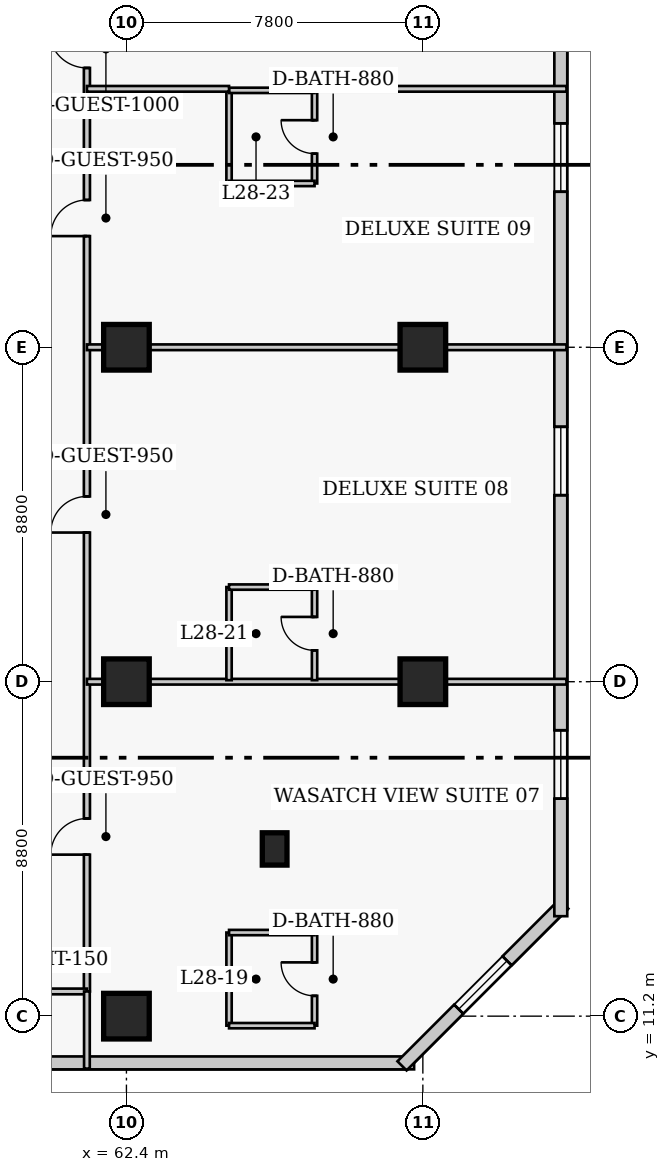
"""IFC4 building model, lengths in metres.
Left out: names, types, materials, properties, quantities, classifications, styles, units other than length and angle.
Written with IfcOpenShell. Run it as: python <this file> out.ifc"""

import sys

from ifc_helpers import new_model, si_unit, direction, frame, frame_2d, origin, origin_2d, place, context, subcontext, project, spatial, rectangle, extrude, element, fill, save


model = new_model("IFC4")
c1 = context("Model", 3, precision=1e-05, world=origin(), true_north=direction((0.0, 1.0)))
c2 = subcontext(c1, "Body", "Model", "MODEL_VIEW")
j1 = project(units=[si_unit("LENGTHUNIT", "METRE"), si_unit("PLANEANGLEUNIT", "RADIAN")], contexts=[c1])
p1 = place(None, origin())
s1 = spatial("IfcSite", under=j1, at=p1, CompositionType="ELEMENT")
p2 = place(p1, origin())
s2 = spatial("IfcBuilding", under=s1, at=p2, CompositionType="ELEMENT")
p3 = place(p2, frame((0.0, 0.0, 114.6)))
s3 = spatial("IfcBuildingStorey", under=s2, at=p3, CompositionType="ELEMENT", Elevation=114.6)
for number, where, z_axis, x_axis in (
    (1, (62.4, 11.2, 0.0), (0.0, 0.0, 1.0), (1.0, 0.0, 0.0)),
    (2, (62.4, 20.0, 0.0), (0.0, 0.0, 1.0), (1.0, 0.0, 0.0)),
    (3, (62.4, 28.8, 0.0), (0.0, 0.0, 1.0), (1.0, 0.0, 0.0)),
    (4, (70.2, 20.0, 0.0), (0.0, 0.0, 1.0), (1.0, 0.0, 0.0)),
    (5, (70.2, 28.8, 0.0), (0.0, 0.0, 1.0), (1.0, 0.0, 0.0)),
):
    element("IfcColumn", number, at=place(p3, frame(where, z_axis=z_axis, x_axis=x_axis)), inside=s3, PredefinedType="COLUMN", context=c2, shape_type="SweptSolid", body=[
        extrude(rectangle(XDim=1.2, YDim=1.2, at=origin_2d()), origin(), (0.0, 0.0, 1.0), 3.8),
    ])
p4 = place(p3, frame((66.3, 15.6, 0.0), z_axis=(0.0, 0.0, 1.0), x_axis=(1.0, 0.0, 0.0)))
e6 = element("IfcColumn", 6, at=p4, inside=s3, PredefinedType="PILASTER", context=c2, shape_type="SweptSolid", body=[
    extrude(rectangle(XDim=0.65, YDim=0.85, at=origin_2d()), origin(), (0.0, 0.0, 1.0), 3.8),
])
p5 = place(p3, frame((41.68, 9.97, 0.0), z_axis=(0.0, 0.0, 1.0), x_axis=(1.0, 0.0, 0.0)))
e7 = element("IfcWall", 7, at=p5, inside=s3, PredefinedType="SOLIDWALL", context=c2, shape_type="SweptSolid", body=[
    extrude(rectangle(XDim=28.29, YDim=0.34, at=frame_2d((14.145, 0.0))), origin(), (0.0, 0.0, 1.0), 3.54),
])
p6 = place(p5, frame((8.32, 0.0, 0.0)))
e8 = element("IfcOpeningElement", 8, at=p6, cuts=e7, PredefinedType="OPENING", context=c2, shape_type="SweptSolid", body=[
    extrude(rectangle(XDim=1.4, YDim=2.15, at=frame_2d((0.7, 1.075))), frame((0.0, 0.18, 0.0), z_axis=(0.0, -1.0, 0.0), x_axis=(1.0, 0.0, 0.0)), (0.0, 0.0, 1.0), 0.36),
])
p7 = place(p5, frame((2.665, 0.0, 0.85)))
e9 = element("IfcOpeningElement", 9, at=p7, cuts=e7, PredefinedType="OPENING", context=c2, shape_type="SweptSolid", body=[
    extrude(rectangle(XDim=1.8, YDim=1.8, at=frame_2d((0.9, 0.9))), frame((0.0, 0.18, 0.0), z_axis=(0.0, -1.0, 0.0), x_axis=(1.0, 0.0, 0.0)), (0.0, 0.0, 1.0), 0.36),
])
p8 = place(p5, frame((13.895, 0.0, 0.85)))
e10 = element("IfcOpeningElement", 10, at=p8, cuts=e7, PredefinedType="OPENING", context=c2, shape_type="SweptSolid", body=[
    extrude(rectangle(XDim=1.8, YDim=1.8, at=frame_2d((0.9, 0.9))), frame((0.0, 0.18, 0.0), z_axis=(0.0, -1.0, 0.0), x_axis=(1.0, 0.0, 0.0)), (0.0, 0.0, 1.0), 0.36),
])
p9 = place(p3, frame((69.652, 9.892, 0.0), z_axis=(0.0, 0.0, 1.0), x_axis=(0.707106781187, 0.707106781187, 0.0)))
e11 = element("IfcWall", 11, at=p9, inside=s3, PredefinedType="SOLIDWALL", context=c2, shape_type="SweptSolid", body=[
    extrude(rectangle(XDim=6.02, YDim=0.34, at=frame_2d((3.01, 0.0))), origin(), (0.0, 0.0, 1.0), 3.54),
])
p10 = place(p9, frame((2.11, 0.0, 0.85)))
e12 = element("IfcOpeningElement", 12, at=p10, cuts=e11, PredefinedType="OPENING", context=c2, shape_type="SweptSolid", body=[
    extrude(rectangle(XDim=1.8, YDim=1.8, at=frame_2d((0.9, 0.9))), frame((0.0, 0.18, 0.0), z_axis=(0.0, -1.0, 0.0), x_axis=(1.0, 0.0, 0.0)), (0.0, 0.0, 1.0), 0.36),
])
p11 = place(p3, frame((73.83, 13.83, 0.0), z_axis=(0.0, 0.0, 1.0), x_axis=(0.0, 1.0, 0.0)))
e13 = element("IfcWall", 13, at=p11, inside=s3, PredefinedType="SOLIDWALL", context=c2, shape_type="SweptSolid", body=[
    extrude(rectangle(XDim=31.94, YDim=0.34, at=frame_2d((15.97, 0.0))), origin(), (0.0, 0.0, 1.0), 3.54),
])
p12 = place(p11, frame((3.093, 0.0, 0.85)))
e14 = element("IfcOpeningElement", 14, at=p12, cuts=e13, PredefinedType="OPENING", context=c2, shape_type="SweptSolid", body=[
    extrude(rectangle(XDim=1.8, YDim=1.8, at=frame_2d((0.9, 0.9))), frame((0.0, 0.18, 0.0), z_axis=(0.0, -1.0, 0.0), x_axis=(1.0, 0.0, 0.0)), (0.0, 0.0, 1.0), 0.36),
])
p13 = place(p11, frame((11.077, 0.0, 0.85)))
e15 = element("IfcOpeningElement", 15, at=p13, cuts=e13, PredefinedType="OPENING", context=c2, shape_type="SweptSolid", body=[
    extrude(rectangle(XDim=1.8, YDim=1.8, at=frame_2d((0.9, 0.9))), frame((0.0, 0.18, 0.0), z_axis=(0.0, -1.0, 0.0), x_axis=(1.0, 0.0, 0.0)), (0.0, 0.0, 1.0), 0.36),
])
p14 = place(p11, frame((19.062, 0.0, 0.85)))
e16 = element("IfcOpeningElement", 16, at=p14, cuts=e13, PredefinedType="OPENING", context=c2, shape_type="SweptSolid", body=[
    extrude(rectangle(XDim=1.8, YDim=1.8, at=frame_2d((0.9, 0.9))), frame((0.0, 0.18, 0.0), z_axis=(0.0, -1.0, 0.0), x_axis=(1.0, 0.0, 0.0)), (0.0, 0.0, 1.0), 0.36),
])
p15 = place(p11, frame((27.048, 0.0, 0.85)))
e17 = element("IfcOpeningElement", 17, at=p15, cuts=e13, PredefinedType="OPENING", context=c2, shape_type="SweptSolid", body=[
    extrude(rectangle(XDim=1.8, YDim=1.8, at=frame_2d((0.9, 0.9))), frame((0.0, 0.18, 0.0), z_axis=(0.0, -1.0, 0.0), x_axis=(1.0, 0.0, 0.0)), (0.0, 0.0, 1.0), 0.36),
])
p16 = place(p3, frame((61.36, 11.85, 0.0), z_axis=(0.0, 0.0, 1.0), x_axis=(0.0, 1.0, 0.0)))
e18 = element("IfcWall", 18, at=p16, inside=s3, PredefinedType="PARTITIONING", context=c2, shape_type="SweptSolid", body=[
    extrude(rectangle(XDim=28.8, YDim=0.16, at=frame_2d((14.4, 0.0))), origin(), (0.0, 0.0, 1.0), 3.54),
])
p17 = place(p16, frame((3.6, 0.0, 0.0)))
e19 = element("IfcOpeningElement", 19, at=p17, cuts=e18, PredefinedType="OPENING", context=c2, shape_type="SweptSolid", body=[
    extrude(rectangle(XDim=0.95, YDim=2.1, at=frame_2d((0.475, 1.05))), frame((0.0, 0.09, 0.0), z_axis=(0.0, -1.0, 0.0), x_axis=(1.0, 0.0, 0.0)), (0.0, 0.0, 1.0), 0.18),
])
p18 = place(p16, frame((12.075, 0.0, 0.0)))
e20 = element("IfcOpeningElement", 20, at=p18, cuts=e18, PredefinedType="OPENING", context=c2, shape_type="SweptSolid", body=[
    extrude(rectangle(XDim=0.95, YDim=2.1, at=frame_2d((0.475, 1.05))), frame((0.0, 0.09, 0.0), z_axis=(0.0, -1.0, 0.0), x_axis=(1.0, 0.0, 0.0)), (0.0, 0.0, 1.0), 0.18),
])
p19 = place(p16, frame((19.875, 0.0, 0.0)))
e21 = element("IfcOpeningElement", 21, at=p19, cuts=e18, PredefinedType="OPENING", context=c2, shape_type="SweptSolid", body=[
    extrude(rectangle(XDim=0.95, YDim=2.1, at=frame_2d((0.475, 1.05))), frame((0.0, 0.09, 0.0), z_axis=(0.0, -1.0, 0.0), x_axis=(1.0, 0.0, 0.0)), (0.0, 0.0, 1.0), 0.18),
])
p20 = place(p16, frame((24.3, 0.0, 0.0)))
e22 = element("IfcOpeningElement", 22, at=p20, cuts=e18, PredefinedType="OPENING", context=c2, shape_type="SweptSolid", body=[
    extrude(rectangle(XDim=1.0, YDim=2.15, at=frame_2d((0.5, 1.075))), frame((0.0, 0.09, 0.0), z_axis=(0.0, -1.0, 0.0), x_axis=(1.0, 0.0, 0.0)), (0.0, 0.0, 1.0), 0.18),
])
p21 = place(p3, frame((59.14, 11.85, 0.0), z_axis=(0.0, 0.0, 1.0), x_axis=(1.0, 0.0, 0.0)))
e23 = element("IfcWall", 23, at=p21, inside=s3, PredefinedType="PARTITIONING", context=c2, shape_type="SweptSolid", body=[
    extrude(rectangle(XDim=2.22, YDim=0.15, at=frame_2d((1.11, 0.0))), origin(), (0.0, 0.0, 1.0), 3.54),
])
p22 = place(p3, frame((61.36, 9.82, 0.0), z_axis=(0.0, 0.0, 1.0), x_axis=(0.0, 1.0, 0.0)))
e24 = element("IfcWall", 24, at=p22, inside=s3, PredefinedType="PARTITIONING", context=c2, shape_type="SweptSolid", body=[
    extrude(rectangle(XDim=2.03, YDim=0.15, at=frame_2d((1.015, 0.0))), origin(), (0.0, 0.0, 1.0), 3.54),
])
p23 = place(p3, frame((65.1, 10.95, 0.0), z_axis=(0.0, 0.0, 1.0), x_axis=(0.0, 1.0, 0.0)))
e25 = element("IfcWall", 25, at=p23, inside=s3, PredefinedType="PLUMBINGWALL", context=c2, shape_type="SweptSolid", body=[
    extrude(rectangle(XDim=2.45, YDim=0.14, at=frame_2d((1.225, 0.0))), origin(), (0.0, 0.0, 1.0), 3.54),
])
p24 = place(p3, frame((67.35, 10.95, 0.0), z_axis=(0.0, 0.0, 1.0), x_axis=(0.0, 1.0, 0.0)))
e26 = element("IfcWall", 26, at=p24, inside=s3, PredefinedType="PLUMBINGWALL", context=c2, shape_type="SweptSolid", body=[
    extrude(rectangle(XDim=2.45, YDim=0.14, at=frame_2d((1.225, 0.0))), origin(), (0.0, 0.0, 1.0), 3.54),
])
p25 = place(p24, frame((0.785, 0.0, 0.0)))
e27 = element("IfcOpeningElement", 27, at=p25, cuts=e26, PredefinedType="OPENING", context=c2, shape_type="SweptSolid", body=[
    extrude(rectangle(XDim=0.88, YDim=2.05, at=frame_2d((0.44, 1.025))), frame((0.0, 0.08, 0.0), z_axis=(0.0, -1.0, 0.0), x_axis=(1.0, 0.0, 0.0)), (0.0, 0.0, 1.0), 0.16),
])
for number, where, z_axis, x_axis in (
    (28, (65.1, 10.95, 0.0), (0.0, 0.0, 1.0), (1.0, 0.0, 0.0)),
    (29, (65.1, 13.4, 0.0), (0.0, 0.0, 1.0), (1.0, 0.0, 0.0)),
):
    element("IfcWall", number, at=place(p3, frame(where, z_axis=z_axis, x_axis=x_axis)), inside=s3, PredefinedType="PLUMBINGWALL", context=c2, shape_type="SweptSolid", body=[
        extrude(rectangle(XDim=2.25, YDim=0.14, at=frame_2d((1.125, 0.0))), origin(), (0.0, 0.0, 1.0), 3.54),
    ])
p26 = place(p3, frame((61.36, 20.0, 0.0), z_axis=(0.0, 0.0, 1.0), x_axis=(1.0, 0.0, 0.0)))
e30 = element("IfcWall", 30, at=p26, inside=s3, PredefinedType="PARTITIONING", context=c2, shape_type="SweptSolid", body=[
    extrude(rectangle(XDim=12.62, YDim=0.15, at=frame_2d((6.31, 0.0))), origin(), (0.0, 0.0, 1.0), 2.679),
])
p27 = place(p3, frame((65.1, 20.04, 0.0), z_axis=(0.0, 0.0, 1.0), x_axis=(0.0, 1.0, 0.0)))
e31 = element("IfcWall", 31, at=p27, inside=s3, PredefinedType="PLUMBINGWALL", context=c2, shape_type="SweptSolid", body=[
    extrude(rectangle(XDim=2.45, YDim=0.14, at=frame_2d((1.225, 0.0))), origin(), (0.0, 0.0, 1.0), 3.54),
])
p28 = place(p3, frame((67.35, 20.04, 0.0), z_axis=(0.0, 0.0, 1.0), x_axis=(0.0, 1.0, 0.0)))
e32 = element("IfcWall", 32, at=p28, inside=s3, PredefinedType="PLUMBINGWALL", context=c2, shape_type="SweptSolid", body=[
    extrude(rectangle(XDim=2.45, YDim=0.14, at=frame_2d((1.225, 0.0))), origin(), (0.0, 0.0, 1.0), 3.54),
])
p29 = place(p28, frame((0.785, 0.0, 0.0)))
e33 = element("IfcOpeningElement", 33, at=p29, cuts=e32, PredefinedType="OPENING", context=c2, shape_type="SweptSolid", body=[
    extrude(rectangle(XDim=0.88, YDim=2.05, at=frame_2d((0.44, 1.025))), frame((0.0, 0.08, 0.0), z_axis=(0.0, -1.0, 0.0), x_axis=(1.0, 0.0, 0.0)), (0.0, 0.0, 1.0), 0.16),
])
p30 = place(p3, frame((65.1, 22.49, 0.0), z_axis=(0.0, 0.0, 1.0), x_axis=(1.0, 0.0, 0.0)))
e34 = element("IfcWall", 34, at=p30, inside=s3, PredefinedType="PLUMBINGWALL", context=c2, shape_type="SweptSolid", body=[
    extrude(rectangle(XDim=2.25, YDim=0.14, at=frame_2d((1.125, 0.0))), origin(), (0.0, 0.0, 1.0), 3.54),
])
p31 = place(p3, frame((61.36, 28.8, 0.0), z_axis=(0.0, 0.0, 1.0), x_axis=(1.0, 0.0, 0.0)))
e35 = element("IfcWall", 35, at=p31, inside=s3, PredefinedType="PARTITIONING", context=c2, shape_type="SweptSolid", body=[
    extrude(rectangle(XDim=12.62, YDim=0.15, at=frame_2d((6.31, 0.0))), origin(), (0.0, 0.0, 1.0), 2.679),
])
p32 = place(p3, frame((65.1, 33.11, 0.0), z_axis=(0.0, 0.0, 1.0), x_axis=(0.0, 1.0, 0.0)))
e36 = element("IfcWall", 36, at=p32, inside=s3, PredefinedType="PLUMBINGWALL", context=c2, shape_type="SweptSolid", body=[
    extrude(rectangle(XDim=2.45, YDim=0.14, at=frame_2d((1.225, 0.0))), origin(), (0.0, 0.0, 1.0), 3.54),
])
p33 = place(p3, frame((67.35, 33.11, 0.0), z_axis=(0.0, 0.0, 1.0), x_axis=(0.0, 1.0, 0.0)))
e37 = element("IfcWall", 37, at=p33, inside=s3, PredefinedType="PLUMBINGWALL", context=c2, shape_type="SweptSolid", body=[
    extrude(rectangle(XDim=2.45, YDim=0.14, at=frame_2d((1.225, 0.0))), origin(), (0.0, 0.0, 1.0), 3.54),
])
p34 = place(p33, frame((0.785, 0.0, 0.0)))
e38 = element("IfcOpeningElement", 38, at=p34, cuts=e37, PredefinedType="OPENING", context=c2, shape_type="SweptSolid", body=[
    extrude(rectangle(XDim=0.88, YDim=2.05, at=frame_2d((0.44, 1.025))), frame((0.0, 0.08, 0.0), z_axis=(0.0, -1.0, 0.0), x_axis=(1.0, 0.0, 0.0)), (0.0, 0.0, 1.0), 0.16),
])
for number, where, z_axis, x_axis in (
    (39, (65.1, 33.11, 0.0), (0.0, 0.0, 1.0), (1.0, 0.0, 0.0)),
    (40, (65.1, 35.56, 0.0), (0.0, 0.0, 1.0), (1.0, 0.0, 0.0)),
):
    element("IfcWall", number, at=place(p3, frame(where, z_axis=z_axis, x_axis=x_axis)), inside=s3, PredefinedType="PLUMBINGWALL", context=c2, shape_type="SweptSolid", body=[
        extrude(rectangle(XDim=2.25, YDim=0.14, at=frame_2d((1.125, 0.0))), origin(), (0.0, 0.0, 1.0), 3.54),
    ])
p35 = place(p3, frame((61.36, 35.6, 0.0), z_axis=(0.0, 0.0, 1.0), x_axis=(1.0, 0.0, 0.0)))
e41 = element("IfcWall", 41, at=p35, inside=s3, PredefinedType="PARTITIONING", context=c2, shape_type="SweptSolid", body=[
    extrude(rectangle(XDim=3.74, YDim=0.15, at=frame_2d((1.87, 0.0))), origin(), (0.0, 0.0, 1.0), 3.54),
])
p36 = place(p3, frame((67.35, 35.6, 0.0), z_axis=(0.0, 0.0, 1.0), x_axis=(1.0, 0.0, 0.0)))
e42 = element("IfcWall", 42, at=p36, inside=s3, PredefinedType="PARTITIONING", context=c2, shape_type="SweptSolid", body=[
    extrude(rectangle(XDim=6.63, YDim=0.15, at=frame_2d((3.315, 0.0))), origin(), (0.0, 0.0, 1.0), 3.54),
])
p37 = place(p10, origin())
e43 = element("IfcWindow", 43, at=p37, inside=s3, PartitioningType="SINGLE_PANEL", PredefinedType="WINDOW", context=c2, shape_type="SweptSolid", body=[
    extrude(rectangle(XDim=1.8, YDim=1.8, at=frame_2d((0.9, 0.9))), frame((0.0, 0.03, 0.0), z_axis=(0.0, -1.0, 0.0), x_axis=(1.0, 0.0, 0.0)), (0.0, 0.0, 1.0), 0.06),
])
fill(e12, e43)
p38 = place(p12, origin())
e44 = element("IfcWindow", 44, at=p38, inside=s3, PartitioningType="SINGLE_PANEL", PredefinedType="WINDOW", context=c2, shape_type="SweptSolid", body=[
    extrude(rectangle(XDim=1.8, YDim=1.8, at=frame_2d((0.9, 0.9))), frame((0.0, 0.03, 0.0), z_axis=(0.0, -1.0, 0.0), x_axis=(1.0, 0.0, 0.0)), (0.0, 0.0, 1.0), 0.06),
])
fill(e14, e44)
p39 = place(p13, origin())
e45 = element("IfcWindow", 45, at=p39, inside=s3, PartitioningType="SINGLE_PANEL", PredefinedType="WINDOW", context=c2, shape_type="SweptSolid", body=[
    extrude(rectangle(XDim=1.8, YDim=1.8, at=frame_2d((0.9, 0.9))), frame((0.0, 0.03, 0.0), z_axis=(0.0, -1.0, 0.0), x_axis=(1.0, 0.0, 0.0)), (0.0, 0.0, 1.0), 0.06),
])
fill(e15, e45)
p40 = place(p14, origin())
e46 = element("IfcWindow", 46, at=p40, inside=s3, PartitioningType="SINGLE_PANEL", PredefinedType="WINDOW", context=c2, shape_type="SweptSolid", body=[
    extrude(rectangle(XDim=1.8, YDim=1.8, at=frame_2d((0.9, 0.9))), frame((0.0, 0.03, 0.0), z_axis=(0.0, -1.0, 0.0), x_axis=(1.0, 0.0, 0.0)), (0.0, 0.0, 1.0), 0.06),
])
fill(e16, e46)
p41 = place(p25, origin())
e47 = element("IfcDoor", 47, at=p41, inside=s3, OperationType="SINGLE_SWING_RIGHT", PredefinedType="DOOR", context=c2, shape_type="SweptSolid", body=[
    extrude(rectangle(XDim=0.88, YDim=2.05, at=frame_2d((0.44, 1.025))), frame((0.0, 0.025, 0.0), z_axis=(0.0, -1.0, 0.0), x_axis=(1.0, 0.0, 0.0)), (0.0, 0.0, 1.0), 0.05),
])
fill(e27, e47)
p42 = place(p17, origin())
e48 = element("IfcDoor", 48, at=p42, inside=s3, OperationType="SINGLE_SWING_LEFT", PredefinedType="DOOR", context=c2, shape_type="SweptSolid", body=[
    extrude(rectangle(XDim=0.95, YDim=2.1, at=frame_2d((0.475, 1.05))), frame((0.0, 0.025, 0.0), z_axis=(0.0, -1.0, 0.0), x_axis=(1.0, 0.0, 0.0)), (0.0, 0.0, 1.0), 0.05),
])
fill(e19, e48)
p43 = place(p29, origin())
e49 = element("IfcDoor", 49, at=p43, inside=s3, OperationType="SINGLE_SWING_RIGHT", PredefinedType="DOOR", context=c2, shape_type="SweptSolid", body=[
    extrude(rectangle(XDim=0.88, YDim=2.05, at=frame_2d((0.44, 1.025))), frame((0.0, 0.025, 0.0), z_axis=(0.0, -1.0, 0.0), x_axis=(1.0, 0.0, 0.0)), (0.0, 0.0, 1.0), 0.05),
])
fill(e33, e49)
p44 = place(p18, origin())
e50 = element("IfcDoor", 50, at=p44, inside=s3, OperationType="SINGLE_SWING_LEFT", PredefinedType="DOOR", context=c2, shape_type="SweptSolid", body=[
    extrude(rectangle(XDim=0.95, YDim=2.1, at=frame_2d((0.475, 1.05))), frame((0.0, 0.025, 0.0), z_axis=(0.0, -1.0, 0.0), x_axis=(1.0, 0.0, 0.0)), (0.0, 0.0, 1.0), 0.05),
])
fill(e20, e50)
p45 = place(p34, origin())
e51 = element("IfcDoor", 51, at=p45, inside=s3, OperationType="SINGLE_SWING_RIGHT", PredefinedType="DOOR", context=c2, shape_type="SweptSolid", body=[
    extrude(rectangle(XDim=0.88, YDim=2.05, at=frame_2d((0.44, 1.025))), frame((0.0, 0.025, 0.0), z_axis=(0.0, -1.0, 0.0), x_axis=(1.0, 0.0, 0.0)), (0.0, 0.0, 1.0), 0.05),
])
fill(e38, e51)
p46 = place(p19, origin())
e52 = element("IfcDoor", 52, at=p46, inside=s3, OperationType="SINGLE_SWING_LEFT", PredefinedType="DOOR", context=c2, shape_type="SweptSolid", body=[
    extrude(rectangle(XDim=0.95, YDim=2.1, at=frame_2d((0.475, 1.05))), frame((0.0, 0.025, 0.0), z_axis=(0.0, -1.0, 0.0), x_axis=(1.0, 0.0, 0.0)), (0.0, 0.0, 1.0), 0.05),
])
fill(e21, e52)
p47 = place(p20, origin())
e53 = element("IfcDoor", 53, at=p47, inside=s3, OperationType="SINGLE_SWING_RIGHT", PredefinedType="DOOR", context=c2, shape_type="SweptSolid", body=[
    extrude(rectangle(XDim=1.0, YDim=2.15, at=frame_2d((0.5, 1.075))), frame((0.0, 0.025, 0.0), z_axis=(0.0, -1.0, 0.0), x_axis=(1.0, 0.0, 0.0)), (0.0, 0.0, 1.0), 0.05),
])
fill(e22, e53)
save(model, sys.argv[1])
